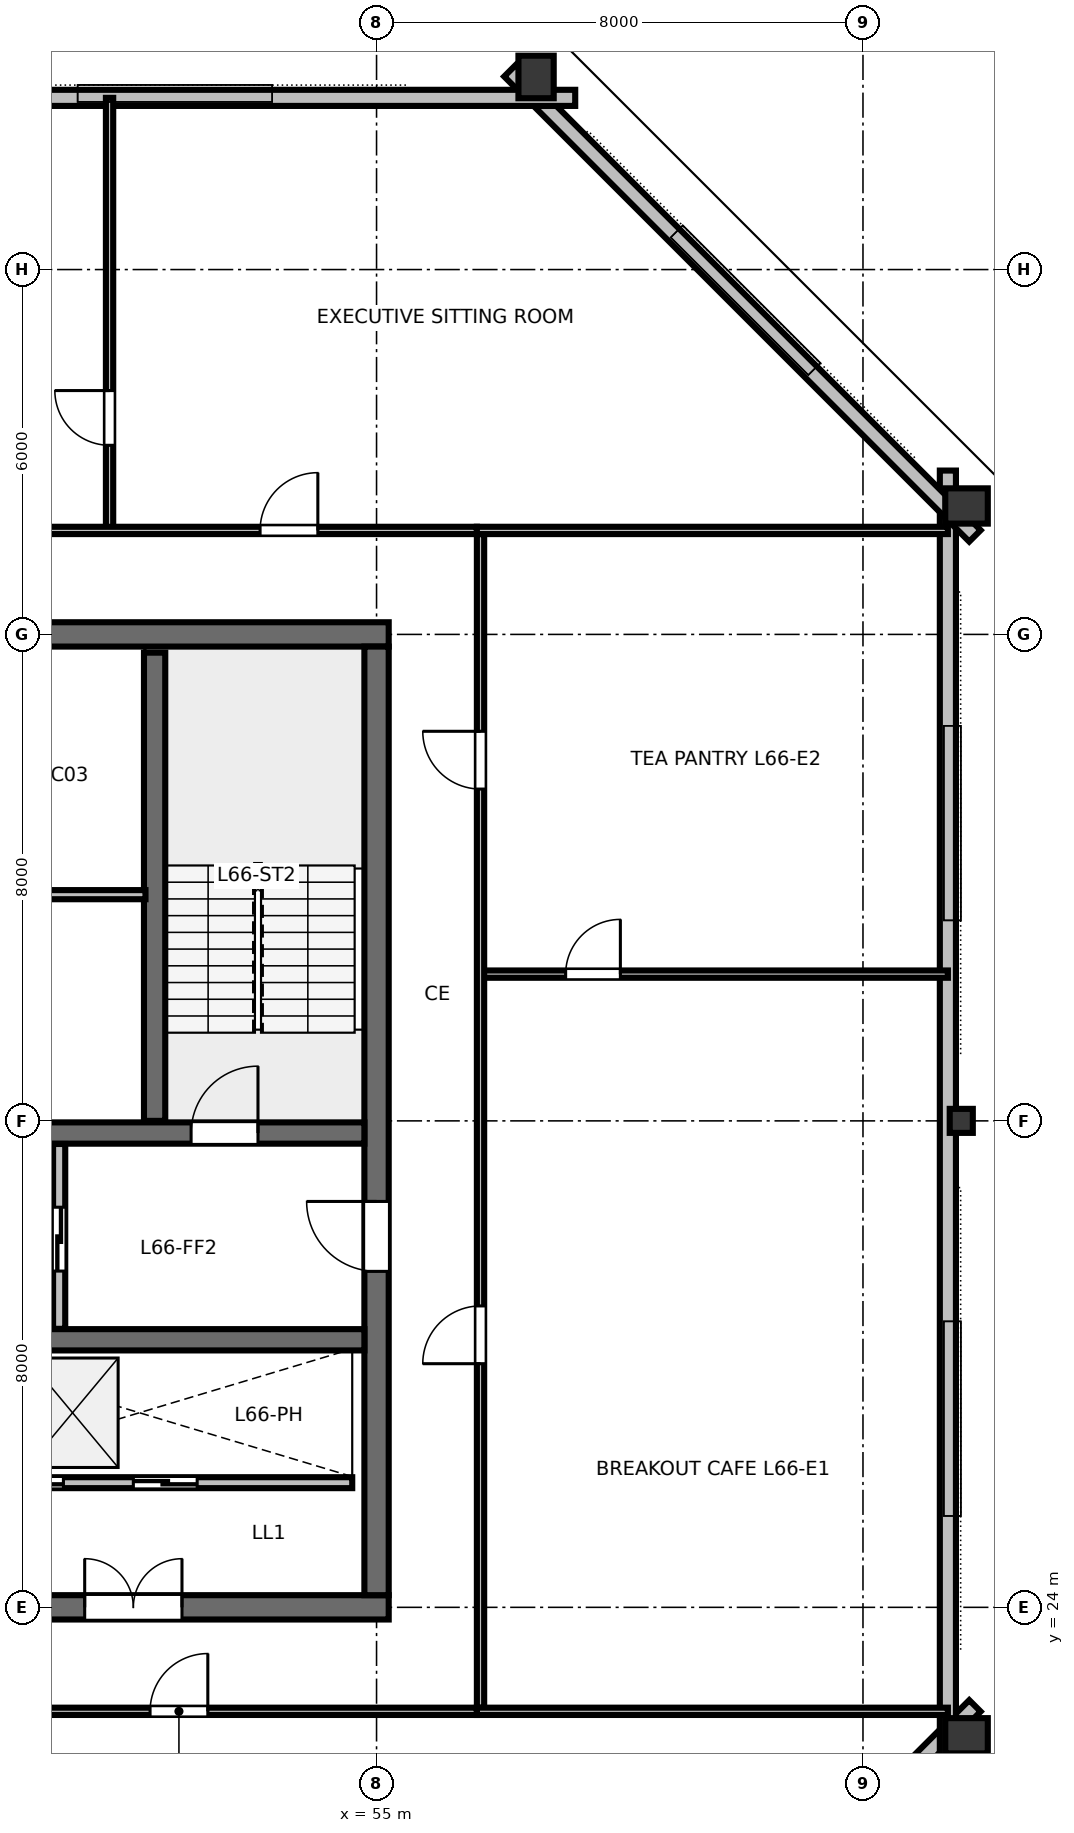
"""IFC4 building model, lengths in metres.
Left out: names, types, materials, properties, quantities, classifications, styles, units other than length and angle.
Written with IfcOpenShell. Run it as: python <this file> out.ifc"""

import sys

from ifc_helpers import new_model, si_unit, direction, frame, frame_2d, origin, origin_2d, place, context, subcontext, project, spatial, rectangle, hollow_rectangle, i_section, extrude, element, fill, save


model = new_model("IFC4")
c1 = context("Model", 3, precision=1e-05, world=origin(), true_north=direction((0.0, 1.0)))
c2 = subcontext(c1, "Body", "Model", "MODEL_VIEW")
j1 = project(units=[si_unit("LENGTHUNIT", "METRE"), si_unit("PLANEANGLEUNIT", "RADIAN")], contexts=[c1])
p1 = place(None, origin())
s1 = spatial("IfcSite", under=j1, at=p1, CompositionType="ELEMENT")
p2 = place(p1, origin())
s2 = spatial("IfcBuilding", under=s1, at=p2, CompositionType="ELEMENT")
p3 = place(p2, frame((0.0, 0.0, 250.2)))
s3 = spatial("IfcBuildingStorey", under=s2, at=p3, CompositionType="ELEMENT", Elevation=250.2)
p4 = place(p3, frame((36.8, 24.0, 0.0), z_axis=(0.0, 0.0, 1.0), x_axis=(1.0, 0.0, 0.0)))
e1 = element("IfcWall", 1, at=p4, inside=s3, PredefinedType="SHEAR", context=c2, shape_type="SweptSolid", body=[
    extrude(rectangle(XDim=18.4, YDim=0.4, at=frame_2d((9.2, 0.0))), origin(), (0.0, 0.0, 1.0), 3.36),
])
p5 = place(p4, frame((13.4, 0.0, 0.0)))
e2 = element("IfcOpeningElement", 2, at=p5, cuts=e1, PredefinedType="OPENING", context=c2, shape_type="SweptSolid", body=[
    extrude(rectangle(XDim=1.6, YDim=2.15, at=frame_2d((0.8, 1.075))), frame((0.0, 0.21, 0.0), z_axis=(0.0, -1.0, 0.0), x_axis=(1.0, 0.0, 0.0)), (0.0, 0.0, 1.0), 0.42),
])
p6 = place(p3, frame((36.8, 40.0, 0.0), z_axis=(0.0, 0.0, 1.0), x_axis=(1.0, 0.0, 0.0)))
e3 = element("IfcWall", 3, at=p6, inside=s3, PredefinedType="SHEAR", context=c2, shape_type="SweptSolid", body=[
    extrude(rectangle(XDim=18.4, YDim=0.4, at=frame_2d((9.2, 0.0))), origin(), (0.0, 0.0, 1.0), 3.36),
])
p7 = place(p6, frame((8.7, 0.0, 0.0)))
e4 = element("IfcOpeningElement", 4, at=p7, cuts=e3, PredefinedType="OPENING", context=c2, shape_type="SweptSolid", body=[
    extrude(rectangle(XDim=1.0, YDim=2.15, at=frame_2d((0.5, 1.075))), frame((0.0, 0.21, 0.0), z_axis=(0.0, -1.0, 0.0), x_axis=(1.0, 0.0, 0.0)), (0.0, 0.0, 1.0), 0.42),
])
p8 = place(p3, frame((55.0, 24.2, 0.0), z_axis=(0.0, 0.0, 1.0), x_axis=(0.0, 1.0, 0.0)))
e5 = element("IfcWall", 5, at=p8, inside=s3, PredefinedType="SHEAR", context=c2, shape_type="SweptSolid", body=[
    extrude(rectangle(XDim=15.6, YDim=0.4, at=frame_2d((7.8, 0.0))), origin(), (0.0, 0.0, 1.0), 3.36),
])
p9 = place(p8, frame((5.325, 0.0, 0.0)))
e6 = element("IfcOpeningElement", 6, at=p9, cuts=e5, PredefinedType="OPENING", context=c2, shape_type="SweptSolid", body=[
    extrude(rectangle(XDim=1.15, YDim=2.15, at=frame_2d((0.575, 1.075))), frame((0.0, 0.21, 0.0), z_axis=(0.0, -1.0, 0.0), x_axis=(1.0, 0.0, 0.0)), (0.0, 0.0, 1.0), 0.42),
])
p10 = place(p3, frame((37.2, 31.8, 0.0), z_axis=(0.0, 0.0, 1.0), x_axis=(1.0, 0.0, 0.0)))
e7 = element("IfcWall", 7, at=p10, inside=s3, PredefinedType="SHEAR", context=c2, shape_type="SweptSolid", body=[
    extrude(rectangle(XDim=17.6, YDim=0.35, at=frame_2d((8.8, 0.0))), origin(), (0.0, 0.0, 1.0), 3.36),
])
p11 = place(p10, frame((0.85, 0.0, 0.0)))
e8 = element("IfcOpeningElement", 8, at=p11, cuts=e7, PredefinedType="OPENING", context=c2, shape_type="SweptSolid", body=[
    extrude(rectangle(XDim=1.1, YDim=2.15, at=frame_2d((0.55, 1.075))), frame((0.0, 0.185, 0.0), z_axis=(0.0, -1.0, 0.0), x_axis=(1.0, 0.0, 0.0)), (0.0, 0.0, 1.0), 0.37),
])
p12 = place(p10, frame((14.75, 0.0, 0.0)))
e9 = element("IfcOpeningElement", 9, at=p12, cuts=e7, PredefinedType="OPENING", context=c2, shape_type="SweptSolid", body=[
    extrude(rectangle(XDim=1.1, YDim=2.15, at=frame_2d((0.55, 1.075))), frame((0.0, 0.185, 0.0), z_axis=(0.0, -1.0, 0.0), x_axis=(1.0, 0.0, 0.0)), (0.0, 0.0, 1.0), 0.37),
])
p13 = place(p3, frame((37.2, 28.4, 0.0), z_axis=(0.0, 0.0, 1.0), x_axis=(1.0, 0.0, 0.0)))
e10 = element("IfcWall", 10, at=p13, inside=s3, PredefinedType="SHEAR", context=c2, shape_type="SweptSolid", body=[
    extrude(rectangle(XDim=17.6, YDim=0.35, at=frame_2d((8.8, 0.0))), origin(), (0.0, 0.0, 1.0), 3.36),
])
p14 = place(p3, frame((64.703, 21.888, 0.0), z_axis=(0.0, 0.0, 1.0), x_axis=(0.0, 1.0, 0.0)))
e11 = element("IfcColumn", 11, at=p14, inside=s3, PredefinedType="COLUMN", context=c2, shape_type="SweptSolid", body=[
    extrude(hollow_rectangle(XDim=0.58, YDim=0.7, WallThickness=0.032, at=origin_2d()), origin(), (0.0, 0.0, 1.0), 3.373),
])
p15 = place(p3, frame((64.616, 32.0, 0.0), z_axis=(0.0, 0.0, 1.0), x_axis=(0.0, 1.0, 0.0)))
e12 = element("IfcColumn", 12, at=p15, inside=s3, PredefinedType="COLUMN", context=c2, shape_type="SweptSolid", body=[
    extrude(i_section(OverallWidth=0.395, OverallDepth=0.38, WebThickness=0.019, FlangeThickness=0.03, FilletRadius=0.025, at=origin_2d()), origin(), (0.0, 0.0, 1.0), 3.373),
])
for number, where, z_axis, x_axis in (
    (13, (64.703, 42.112, 0.0), (0.0, 0.0, 1.0), (0.0, 1.0, 0.0)),
    (14, (57.624, 49.167, 0.0), (0.0, 0.0, 1.0), (1.0, 0.0, 0.0)),
):
    element("IfcColumn", number, at=place(p3, frame(where, z_axis=z_axis, x_axis=x_axis)), inside=s3, PredefinedType="COLUMN", context=c2, shape_type="SweptSolid", body=[
        extrude(hollow_rectangle(XDim=0.58, YDim=0.7, WallThickness=0.032, at=origin_2d()), origin(), (0.0, 0.0, 1.0), 3.373),
    ])
p16 = place(p3, frame((57.193, 14.731, 0.0), z_axis=(0.0, 0.0, 1.0), x_axis=(0.707106781187, 0.707106781187, 0.0)))
e15 = element("IfcWall", 15, at=p16, inside=s3, PredefinedType="STANDARD", context=c2, shape_type="SweptSolid", body=[
    extrude(rectangle(XDim=10.816, YDim=0.265, at=frame_2d((5.408, 0.0))), origin(), (0.0, 0.0, 1.0), 2.832),
])
p17 = place(p3, frame((64.396, 21.305, 0.0), z_axis=(0.0, 0.0, 1.0), x_axis=(0.0, 1.0, 0.0)))
e16 = element("IfcWall", 16, at=p17, inside=s3, PredefinedType="STANDARD", context=c2, shape_type="SweptSolid", body=[
    extrude(rectangle(XDim=21.389, YDim=0.265, at=frame_2d((10.695, 0.0))), origin(), (0.0, 0.0, 1.0), 2.832),
])
p18 = place(p3, frame((64.841, 41.62, 0.0), z_axis=(0.0, 0.0, 1.0), x_axis=(-0.707106781187, 0.707106781187, 0.0)))
e17 = element("IfcWall", 17, at=p18, inside=s3, PredefinedType="STANDARD", context=c2, shape_type="SweptSolid", body=[
    extrude(rectangle(XDim=10.816, YDim=0.265, at=frame_2d((5.408, 0.0))), origin(), (0.0, 0.0, 1.0), 2.832),
])
p19 = place(p3, frame((58.267, 48.823, 0.0), z_axis=(0.0, 0.0, 1.0), x_axis=(-1.0, 0.0, 0.0)))
e18 = element("IfcWall", 18, at=p19, inside=s3, PredefinedType="STANDARD", context=c2, shape_type="SweptSolid", body=[
    extrude(rectangle(XDim=24.535, YDim=0.265, at=frame_2d((12.267, 0.0))), origin(), (0.0, 0.0, 1.0), 2.832),
])
p20 = place(p3, frame((51.35, 32.0, 0.0), z_axis=(0.0, 0.0, 1.0), x_axis=(0.0, 1.0, 0.0)))
e19 = element("IfcWall", 19, at=p20, inside=s3, PredefinedType="SHEAR", context=c2, shape_type="SweptSolid", body=[
    extrude(rectangle(XDim=7.7, YDim=0.35, at=frame_2d((3.85, 0.0))), origin(), (0.0, 0.0, 1.0), 3.6),
])
p21 = place(p3, frame((40.8, 35.72, 0.0), z_axis=(0.0, 0.0, 1.0), x_axis=(1.0, 0.0, 0.0)))
e20 = element("IfcWall", 20, at=p21, inside=s3, PredefinedType="PARTITIONING", context=c2, shape_type="SweptSolid", body=[
    extrude(rectangle(XDim=10.4, YDim=0.15, at=frame_2d((5.2, 0.0))), origin(), (0.0, 0.0, 1.0), 3.375),
])
p22 = place(p21, frame((4.9, 0.0, 0.0)))
e21 = element("IfcOpeningElement", 21, at=p22, cuts=e20, PredefinedType="OPENING", context=c2, shape_type="SweptSolid", body=[
    extrude(rectangle(XDim=0.9, YDim=2.15, at=frame_2d((0.45, 1.075))), frame((0.0, 0.085, 0.0), z_axis=(0.0, -1.0, 0.0), x_axis=(1.0, 0.0, 0.0)), (0.0, 0.0, 1.0), 0.17),
])
p23 = place(p3, frame((49.78, 28.58, 0.0), z_axis=(0.0, 0.0, 1.0), x_axis=(0.0, 1.0, 0.0)))
e22 = element("IfcWall", 22, at=p23, inside=s3, PredefinedType="PARTITIONING", context=c2, shape_type="SweptSolid", body=[
    extrude(rectangle(XDim=3.04, YDim=0.2, at=frame_2d((1.52, 0.0))), origin(), (0.0, 0.0, 1.0), 3.375),
])
p24 = place(p23, frame((0.95, 0.0, 0.0)))
e23 = element("IfcOpeningElement", 23, at=p24, cuts=e22, PredefinedType="OPENING", context=c2, shape_type="SweptSolid", body=[
    extrude(rectangle(XDim=1.05, YDim=2.15, at=frame_2d((0.525, 1.075))), frame((0.0, 0.11, 0.0), z_axis=(0.0, -1.0, 0.0), x_axis=(1.0, 0.0, 0.0)), (0.0, 0.0, 1.0), 0.22),
])
p25 = place(p3, frame((47.6, 26.05, 0.0), z_axis=(0.0, 0.0, 1.0), x_axis=(1.0, 0.0, 0.0)))
e24 = element("IfcWall", 24, at=p25, inside=s3, PredefinedType="PARTITIONING", context=c2, shape_type="SweptSolid", body=[
    extrude(rectangle(XDim=7.0, YDim=0.18, at=frame_2d((3.5, 0.0))), origin(), (0.0, 0.0, 1.0), 3.375),
])
p26 = place(p25, frame((1.2, 0.0, 0.0)))
e25 = element("IfcOpeningElement", 25, at=p26, cuts=e24, PredefinedType="OPENING", context=c2, shape_type="SweptSolid", body=[
    extrude(rectangle(XDim=1.05, YDim=2.15, at=frame_2d((0.525, 1.075))), frame((0.0, 0.1, 0.0), z_axis=(0.0, -1.0, 0.0), x_axis=(1.0, 0.0, 0.0)), (0.0, 0.0, 1.0), 0.2),
])
p27 = place(p25, frame((3.4, 0.0, 0.0)))
e26 = element("IfcOpeningElement", 26, at=p27, cuts=e24, PredefinedType="OPENING", context=c2, shape_type="SweptSolid", body=[
    extrude(rectangle(XDim=1.05, YDim=2.15, at=frame_2d((0.525, 1.075))), frame((0.0, 0.1, 0.0), z_axis=(0.0, -1.0, 0.0), x_axis=(1.0, 0.0, 0.0)), (0.0, 0.0, 1.0), 0.2),
])
p28 = place(p3, frame((46.72, 22.29, 0.0), z_axis=(0.0, 0.0, 1.0), x_axis=(1.0, 0.0, 0.0)))
e27 = element("IfcWall", 27, at=p28, inside=s3, PredefinedType="PARTITIONING", context=c2, shape_type="SweptSolid", body=[
    extrude(rectangle(XDim=9.93, YDim=0.12, at=frame_2d((4.965, 0.0))), origin(), (0.0, 0.0, 1.0), 2.655),
])
p29 = place(p28, frame((4.555, 0.0, 0.0)))
e28 = element("IfcOpeningElement", 28, at=p29, cuts=e27, PredefinedType="OPENING", context=c2, shape_type="SweptSolid", body=[
    extrude(rectangle(XDim=0.95, YDim=2.15, at=frame_2d((0.475, 1.075))), frame((0.0, 0.07, 0.0), z_axis=(0.0, -1.0, 0.0), x_axis=(1.0, 0.0, 0.0)), (0.0, 0.0, 1.0), 0.14),
])
p30 = place(p3, frame((50.609, 41.71, 0.0), z_axis=(0.0, 0.0, 1.0), x_axis=(0.0, 1.0, 0.0)))
e29 = element("IfcWall", 29, at=p30, inside=s3, PredefinedType="PARTITIONING", context=c2, shape_type="SweptSolid", body=[
    extrude(rectangle(XDim=7.114, YDim=0.12, at=frame_2d((3.557, 0.0))), origin(), (0.0, 0.0, 1.0), 2.655),
])
p31 = place(p30, frame((1.4, 0.0, 0.0)))
e30 = element("IfcOpeningElement", 30, at=p31, cuts=e29, PredefinedType="OPENING", context=c2, shape_type="SweptSolid", body=[
    extrude(rectangle(XDim=0.9, YDim=2.15, at=frame_2d((0.45, 1.075))), frame((0.0, 0.07, 0.0), z_axis=(0.0, -1.0, 0.0), x_axis=(1.0, 0.0, 0.0)), (0.0, 0.0, 1.0), 0.14),
])
p32 = place(p3, frame((35.35, 41.71, 0.0), z_axis=(0.0, 0.0, 1.0), x_axis=(1.0, 0.0, 0.0)))
e31 = element("IfcWall", 31, at=p32, inside=s3, PredefinedType="PARTITIONING", context=c2, shape_type="SweptSolid", body=[
    extrude(rectangle(XDim=21.3, YDim=0.12, at=frame_2d((10.65, 0.0))), origin(), (0.0, 0.0, 1.0), 2.655),
])
p33 = place(p32, frame((3.472, 0.0, 0.0)))
e32 = element("IfcOpeningElement", 32, at=p33, cuts=e31, PredefinedType="OPENING", context=c2, shape_type="SweptSolid", body=[
    extrude(rectangle(XDim=0.95, YDim=2.15, at=frame_2d((0.475, 1.075))), frame((0.0, 0.07, 0.0), z_axis=(0.0, -1.0, 0.0), x_axis=(1.0, 0.0, 0.0)), (0.0, 0.0, 1.0), 0.14),
])
p34 = place(p32, frame((12.975, 0.0, 0.0)))
e33 = element("IfcOpeningElement", 33, at=p34, cuts=e31, PredefinedType="OPENING", context=c2, shape_type="SweptSolid", body=[
    extrude(rectangle(XDim=0.95, YDim=2.15, at=frame_2d((0.475, 1.075))), frame((0.0, 0.07, 0.0), z_axis=(0.0, -1.0, 0.0), x_axis=(1.0, 0.0, 0.0)), (0.0, 0.0, 1.0), 0.14),
])
p35 = place(p32, frame((17.735, 0.0, 0.0)))
e34 = element("IfcOpeningElement", 34, at=p35, cuts=e31, PredefinedType="OPENING", context=c2, shape_type="SweptSolid", body=[
    extrude(rectangle(XDim=0.95, YDim=2.15, at=frame_2d((0.475, 1.075))), frame((0.0, 0.07, 0.0), z_axis=(0.0, -1.0, 0.0), x_axis=(1.0, 0.0, 0.0)), (0.0, 0.0, 1.0), 0.14),
])
p36 = place(p3, frame((56.71, 34.413, 0.0), z_axis=(0.0, 0.0, 1.0), x_axis=(1.0, 0.0, 0.0)))
e35 = element("IfcWall", 35, at=p36, inside=s3, PredefinedType="PARTITIONING", context=c2, shape_type="SweptSolid", body=[
    extrude(rectangle(XDim=7.687, YDim=0.12, at=frame_2d((3.843, 0.0))), origin(), (0.0, 0.0, 1.0), 2.655),
])
p37 = place(p36, frame((1.4, 0.0, 0.0)))
e36 = element("IfcOpeningElement", 36, at=p37, cuts=e35, PredefinedType="OPENING", context=c2, shape_type="SweptSolid", body=[
    extrude(rectangle(XDim=0.9, YDim=2.15, at=frame_2d((0.45, 1.075))), frame((0.0, 0.07, 0.0), z_axis=(0.0, -1.0, 0.0), x_axis=(1.0, 0.0, 0.0)), (0.0, 0.0, 1.0), 0.14),
])
p38 = place(p3, frame((56.71, 22.35, 0.0), z_axis=(0.0, 0.0, 1.0), x_axis=(0.0, 1.0, 0.0)))
e37 = element("IfcWall", 37, at=p38, inside=s3, PredefinedType="PARTITIONING", context=c2, shape_type="SweptSolid", body=[
    extrude(rectangle(XDim=19.3, YDim=0.12, at=frame_2d((9.65, 0.0))), origin(), (0.0, 0.0, 1.0), 2.655),
])
p39 = place(p38, frame((5.657, 0.0, 0.0)))
e38 = element("IfcOpeningElement", 38, at=p39, cuts=e37, PredefinedType="OPENING", context=c2, shape_type="SweptSolid", body=[
    extrude(rectangle(XDim=0.95, YDim=2.15, at=frame_2d((0.475, 1.075))), frame((0.0, 0.07, 0.0), z_axis=(0.0, -1.0, 0.0), x_axis=(1.0, 0.0, 0.0)), (0.0, 0.0, 1.0), 0.14),
])
p40 = place(p38, frame((15.107, 0.0, 0.0)))
e39 = element("IfcOpeningElement", 39, at=p40, cuts=e37, PredefinedType="OPENING", context=c2, shape_type="SweptSolid", body=[
    extrude(rectangle(XDim=0.95, YDim=2.15, at=frame_2d((0.475, 1.075))), frame((0.0, 0.07, 0.0), z_axis=(0.0, -1.0, 0.0), x_axis=(1.0, 0.0, 0.0)), (0.0, 0.0, 1.0), 0.14),
])
for number, where, z_axis, x_axis in (
    (40, (56.65, 22.29, 0.0), (0.0, 0.0, 1.0), (1.0, 0.0, 0.0)),
    (41, (56.65, 41.71, 0.0), (0.0, 0.0, 1.0), (1.0, 0.0, 0.0)),
):
    element("IfcWall", number, at=place(p3, frame(where, z_axis=z_axis, x_axis=x_axis)), inside=s3, PredefinedType="PARTITIONING", context=c2, shape_type="SweptSolid", body=[
        extrude(rectangle(XDim=7.747, YDim=0.12, at=frame_2d((3.873, 0.0))), origin(), (0.0, 0.0, 1.0), 2.655),
    ])
p41 = place(p12, origin())
e42 = element("IfcDoor", 42, at=p41, inside=s3, OperationType="SINGLE_SWING_RIGHT", PredefinedType="DOOR", context=c2, shape_type="SweptSolid", body=[
    extrude(rectangle(XDim=1.1, YDim=2.15, at=frame_2d((0.55, 1.075))), frame((0.0, 0.025, 0.0), z_axis=(0.0, -1.0, 0.0), x_axis=(1.0, 0.0, 0.0)), (0.0, 0.0, 1.0), 0.05),
])
fill(e9, e42)
p42 = place(p9, origin())
e43 = element("IfcDoor", 43, at=p42, inside=s3, OperationType="SINGLE_SWING_RIGHT", PredefinedType="DOOR", context=c2, shape_type="SweptSolid", body=[
    extrude(rectangle(XDim=1.15, YDim=2.15, at=frame_2d((0.575, 1.075))), frame((0.0, 0.025, 0.0), z_axis=(0.0, -1.0, 0.0), x_axis=(1.0, 0.0, 0.0)), (0.0, 0.0, 1.0), 0.05),
])
fill(e6, e43)
p43 = place(p5, origin())
e44 = element("IfcDoor", 44, at=p43, inside=s3, OperationType="DOUBLE_DOOR_SINGLE_SWING", PredefinedType="DOOR", context=c2, shape_type="SweptSolid", body=[
    extrude(rectangle(XDim=1.6, YDim=2.15, at=frame_2d((0.8, 1.075))), frame((0.0, 0.025, 0.0), z_axis=(0.0, -1.0, 0.0), x_axis=(1.0, 0.0, 0.0)), (0.0, 0.0, 1.0), 0.05),
])
fill(e2, e44)
p44 = place(p24, origin())
e45 = element("IfcDoor", 45, at=p44, inside=s3, OperationType="SLIDING_TO_RIGHT", PredefinedType="DOOR", context=c2, shape_type="SweptSolid", body=[
    extrude(rectangle(XDim=1.05, YDim=2.15, at=frame_2d((0.525, 1.075))), frame((0.0, 0.025, 0.0), z_axis=(0.0, -1.0, 0.0), x_axis=(1.0, 0.0, 0.0)), (0.0, 0.0, 1.0), 0.05),
])
fill(e23, e45)
p45 = place(p26, origin())
e46 = element("IfcDoor", 46, at=p45, inside=s3, OperationType="SLIDING_TO_LEFT", PredefinedType="DOOR", context=c2, shape_type="SweptSolid", body=[
    extrude(rectangle(XDim=1.05, YDim=2.15, at=frame_2d((0.525, 1.075))), frame((0.0, 0.025, 0.0), z_axis=(0.0, -1.0, 0.0), x_axis=(1.0, 0.0, 0.0)), (0.0, 0.0, 1.0), 0.05),
])
fill(e25, e46)
p46 = place(p27, origin())
e47 = element("IfcDoor", 47, at=p46, inside=s3, OperationType="SLIDING_TO_RIGHT", PredefinedType="DOOR", context=c2, shape_type="SweptSolid", body=[
    extrude(rectangle(XDim=1.05, YDim=2.15, at=frame_2d((0.525, 1.075))), frame((0.0, 0.025, 0.0), z_axis=(0.0, -1.0, 0.0), x_axis=(1.0, 0.0, 0.0)), (0.0, 0.0, 1.0), 0.05),
])
fill(e26, e47)
p47 = place(p29, origin())
e48 = element("IfcDoor", 48, at=p47, inside=s3, OperationType="SINGLE_SWING_RIGHT", PredefinedType="DOOR", context=c2, shape_type="SweptSolid", body=[
    extrude(rectangle(XDim=0.95, YDim=2.15, at=frame_2d((0.475, 1.075))), frame((0.0, 0.025, 0.0), z_axis=(0.0, -1.0, 0.0), x_axis=(1.0, 0.0, 0.0)), (0.0, 0.0, 1.0), 0.05),
])
fill(e28, e48)
p48 = place(p31, origin())
e49 = element("IfcDoor", 49, at=p48, inside=s3, OperationType="SINGLE_SWING_RIGHT", PredefinedType="DOOR", context=c2, shape_type="SweptSolid", body=[
    extrude(rectangle(XDim=0.9, YDim=2.15, at=frame_2d((0.45, 1.075))), frame((0.0, 0.025, 0.0), z_axis=(0.0, -1.0, 0.0), x_axis=(1.0, 0.0, 0.0)), (0.0, 0.0, 1.0), 0.05),
])
fill(e30, e49)
p49 = place(p35, origin())
e50 = element("IfcDoor", 50, at=p49, inside=s3, OperationType="SINGLE_SWING_RIGHT", PredefinedType="DOOR", context=c2, shape_type="SweptSolid", body=[
    extrude(rectangle(XDim=0.95, YDim=2.15, at=frame_2d((0.475, 1.075))), frame((0.0, 0.025, 0.0), z_axis=(0.0, -1.0, 0.0), x_axis=(1.0, 0.0, 0.0)), (0.0, 0.0, 1.0), 0.05),
])
fill(e34, e50)
p50 = place(p37, origin())
e51 = element("IfcDoor", 51, at=p50, inside=s3, OperationType="SINGLE_SWING_RIGHT", PredefinedType="DOOR", context=c2, shape_type="SweptSolid", body=[
    extrude(rectangle(XDim=0.9, YDim=2.15, at=frame_2d((0.45, 1.075))), frame((0.0, 0.025, 0.0), z_axis=(0.0, -1.0, 0.0), x_axis=(1.0, 0.0, 0.0)), (0.0, 0.0, 1.0), 0.05),
])
fill(e36, e51)
p51 = place(p39, origin())
e52 = element("IfcDoor", 52, at=p51, inside=s3, OperationType="SINGLE_SWING_LEFT", PredefinedType="DOOR", context=c2, shape_type="SweptSolid", body=[
    extrude(rectangle(XDim=0.95, YDim=2.15, at=frame_2d((0.475, 1.075))), frame((0.0, 0.025, 0.0), z_axis=(0.0, -1.0, 0.0), x_axis=(1.0, 0.0, 0.0)), (0.0, 0.0, 1.0), 0.05),
])
fill(e38, e52)
p52 = place(p40, origin())
e53 = element("IfcDoor", 53, at=p52, inside=s3, OperationType="SINGLE_SWING_RIGHT", PredefinedType="DOOR", context=c2, shape_type="SweptSolid", body=[
    extrude(rectangle(XDim=0.95, YDim=2.15, at=frame_2d((0.475, 1.075))), frame((0.0, 0.025, 0.0), z_axis=(0.0, -1.0, 0.0), x_axis=(1.0, 0.0, 0.0)), (0.0, 0.0, 1.0), 0.05),
])
fill(e39, e53)
save(model, sys.argv[1])
